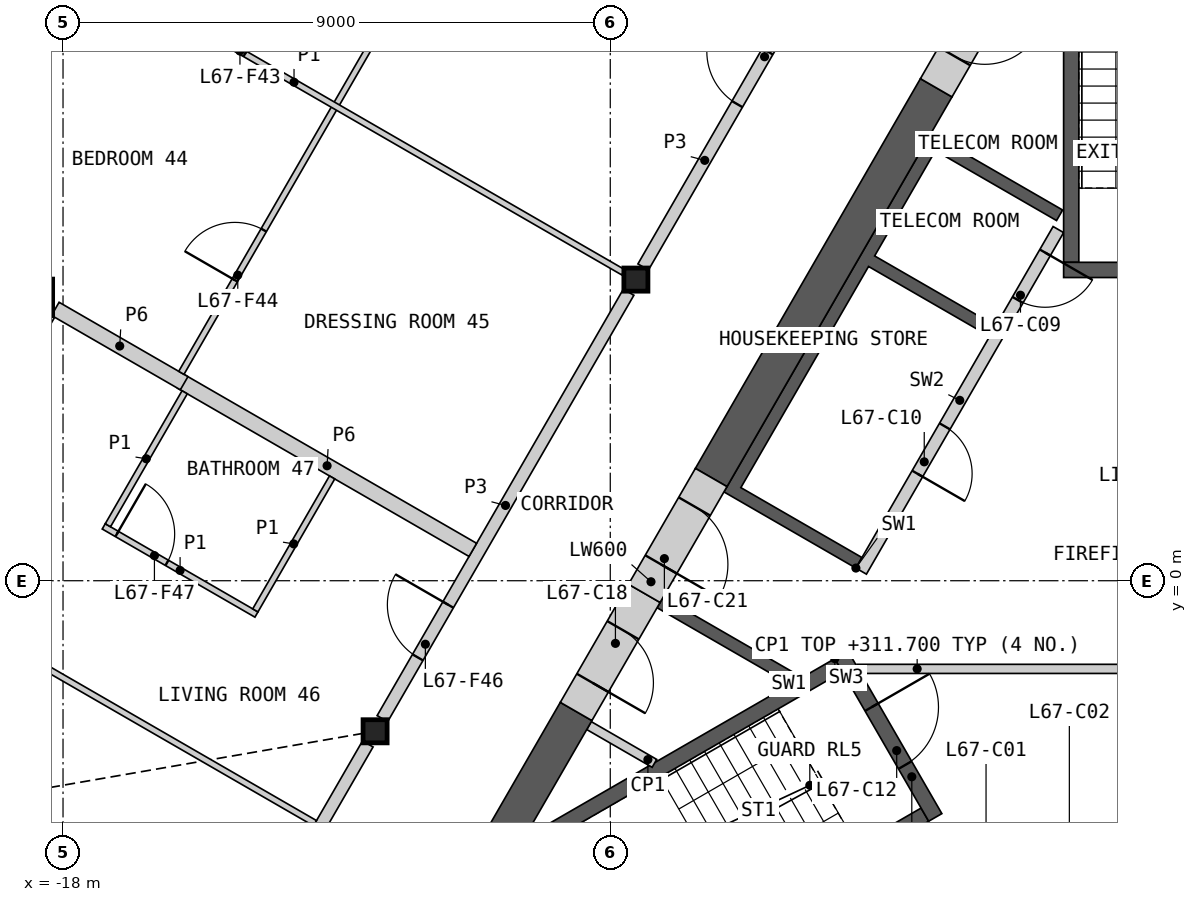
"""IFC4 building model, lengths in metres.
Left out: names, types, materials, properties, quantities, classifications, styles, units other than length and angle.
Written with IfcOpenShell. Run it as: python <this file> out.ifc"""

import sys

from ifc_helpers import new_model, si_unit, direction, frame, frame_2d, origin, origin_2d, place, context, subcontext, project, spatial, polyline, rectangle, hollow_rectangle, i_section, outline, extrude, element, fill, save


model = new_model("IFC4")
c1 = context("Model", 3, precision=1e-05, world=origin(), true_north=direction((0.0, 1.0)))
c2 = subcontext(c1, "Body", "Model", "MODEL_VIEW")
j1 = project(units=[si_unit("LENGTHUNIT", "METRE"), si_unit("PLANEANGLEUNIT", "RADIAN")], contexts=[c1])
p1 = place(None, origin())
s1 = spatial("IfcSite", under=j1, at=p1, CompositionType="ELEMENT")
p2 = place(p1, origin())
s2 = spatial("IfcBuilding", under=s1, at=p2, CompositionType="ELEMENT")
p3 = place(p2, frame((0.0, 0.0, 308.6)))
s3 = spatial("IfcBuildingStorey", under=s2, at=p3, CompositionType="ELEMENT", Elevation=308.6)
p4 = place(p3, frame((-18.471, 4.661, 0.0), z_axis=(0.0, 0.0, 1.0), x_axis=(1.0, 0.0, 0.0)))
e1 = element("IfcColumn", 1, at=p4, inside=s3, PredefinedType="COLUMN", context=c2, shape_type="SweptSolid", body=[
    extrude(hollow_rectangle(XDim=0.6, YDim=0.6, WallThickness=0.04, at=origin_2d()), origin(), (0.0, 0.0, 1.0), 3.4),
])
for number, where, z_axis, x_axis in (
    (2, (-8.578, 4.953, 0.0), (0.0, 0.0, 1.0), (1.0, 0.0, 0.0)),
    (3, (-12.868, -2.476, 0.0), (0.0, 0.0, 1.0), (1.0, 0.0, 0.0)),
):
    element("IfcColumn", number, at=place(p3, frame(where, z_axis=z_axis, x_axis=x_axis)), inside=s3, PredefinedType="COLUMN", context=c2, shape_type="SweptSolid", body=[
        extrude(i_section(OverallWidth=0.396, OverallDepth=0.381, WebThickness=0.019, FlangeThickness=0.03, at=origin_2d()), origin(), (0.0, 0.0, 1.0), 3.4),
    ])
p5 = place(p3, origin())
e4 = element("IfcWall", 4, at=p5, inside=s3, PredefinedType="SHEAR", context=c2, shape_type="SweptSolid", body=[
    extrude(outline(polyline([(-6.061, -1.697), (-8.231, -0.444), (-8.131, -0.271), (-5.96, -1.524), (-6.061, -1.697)])), origin(), (0.0, 0.0, 1.0), 3.1),
])
p6 = place(p3, origin())
e5 = element("IfcWall", 5, at=p6, inside=s3, PredefinedType="SHEAR", context=c2, shape_type="SweptSolid", body=[
    extrude(outline(polyline([(-4.96, 0.208), (-7.131, 1.461), (-3.731, 7.35), (-1.561, 6.097), (-1.66, 5.924), (-3.652, 7.074), (-4.652, 5.342), (-2.66, 4.192), (-2.76, 4.019), (-4.752, 5.169), (-6.852, 1.531), (-4.861, 0.381), (-4.96, 0.208)])), origin(), (0.0, 0.0, 1.0), 3.1),
])
p7 = place(p3, frame((-1.631, 5.776, 0.0), z_axis=(0.0, 0.0, 1.0), x_axis=(-0.499992876559, -0.866029516466, 0.0)))
e6 = element("IfcWall", 6, at=p7, inside=s3, PredefinedType="SOLIDWALL", context=c2, shape_type="SweptSolid", body=[
    extrude(rectangle(XDim=6.486, YDim=0.2, at=frame_2d((3.243, 0.0))), origin(), (0.0, 0.0, 1.0), 3.1),
])
p8 = place(p7, frame((0.437, 0.0, 0.0)))
e7 = element("IfcOpeningElement", 7, at=p8, cuts=e6, PredefinedType="OPENING", context=c2, shape_type="SweptSolid", body=[
    extrude(rectangle(XDim=0.9, YDim=2.1, at=frame_2d((0.45, 1.05))), frame((0.0, 0.11, 0.0), z_axis=(0.0, -1.0, 0.0), x_axis=(1.0, 0.0, 0.0)), (0.0, 0.0, 1.0), 0.22),
])
p9 = place(p7, frame((3.737, 0.0, 0.0)))
e8 = element("IfcOpeningElement", 8, at=p9, cuts=e6, PredefinedType="OPENING", context=c2, shape_type="SweptSolid", body=[
    extrude(rectangle(XDim=0.9, YDim=2.1, at=frame_2d((0.45, 1.05))), frame((0.0, 0.11, 0.0), z_axis=(0.0, -1.0, 0.0), x_axis=(1.0, 0.0, 0.0)), (0.0, 0.0, 1.0), 0.22),
])
p10 = place(p3, frame((-4.941, -1.45, 0.0), z_axis=(0.0, 0.0, 1.0), x_axis=(1.0, 0.0, 0.0)))
e9 = element("IfcWall", 9, at=p10, inside=s3, PredefinedType="PARTITIONING", context=c2, shape_type="SweptSolid", body=[
    extrude(rectangle(XDim=9.882, YDim=0.15, at=frame_2d((4.941, 0.0))), origin(), (0.0, 0.0, 1.0), 3.1),
])
p11 = place(p10, frame((4.391, 0.0, 0.0)))
e10 = element("IfcOpeningElement", 10, at=p11, cuts=e9, PredefinedType="OPENING", context=c2, shape_type="SweptSolid", body=[
    extrude(rectangle(XDim=1.1, YDim=2.1, at=frame_2d((0.55, 1.05))), frame((0.0, 0.085, 0.0), z_axis=(0.0, -1.0, 0.0), x_axis=(1.0, 0.0, 0.0)), (0.0, 0.0, 1.0), 0.17),
])
p12 = place(p3, origin())
e11 = element("IfcWall", 11, at=p12, inside=s3, PredefinedType="SHEAR", context=c2, shape_type="SweptSolid", body=[
    extrude(outline(polyline([(-5.307, -1.281), (-10.374, -4.206), (-10.032, -4.298), (-5.182, -1.498), (-5.307, -1.281)])), origin(), (0.0, 0.0, 1.0), 3.1),
])
p13 = place(p3, origin())
e12 = element("IfcWall", 12, at=p13, inside=s3, PredefinedType="SHEAR", context=c2, shape_type="SweptSolid", body=[
    extrude(outline(polyline([(-8.738, -6.539), (-8.83, -6.881), (-3.763, -3.956), (-3.888, -3.739), (-8.738, -6.539)])), origin(), (0.0, 0.0, 1.0), 3.1),
])
p14 = place(p3, frame((-5.199, -1.219, 0.0), z_axis=(0.0, 0.0, 1.0), x_axis=(0.499982516597, -0.866035497597, 0.0)))
e13 = element("IfcWall", 13, at=p14, inside=s3, PredefinedType="SHEAR", context=c2, shape_type="SweptSolid", body=[
    extrude(rectangle(XDim=3.088, YDim=0.25, at=frame_2d((1.544, 0.0))), origin(), (0.0, 0.0, 1.0), 3.1),
])
p15 = place(p14, frame((0.994, 0.0, 0.0)))
e14 = element("IfcOpeningElement", 14, at=p15, cuts=e13, PredefinedType="OPENING", context=c2, shape_type="SweptSolid", body=[
    extrude(rectangle(XDim=1.1, YDim=2.1, at=frame_2d((0.55, 1.05))), frame((0.0, 0.135, 0.0), z_axis=(0.0, -1.0, 0.0), x_axis=(1.0, 0.0, 0.0)), (0.0, 0.0, 1.0), 0.27),
])
p16 = place(p3, origin())
e15 = element("IfcWall", 15, at=p16, inside=s3, PredefinedType="SHEAR", context=c2, shape_type="SweptSolid", body=[
    extrude(outline(polyline([(-1.294, 10.837), (-1.544, 11.087), (-1.544, 5.237), (-1.294, 5.237), (-1.294, 10.837)])), origin(), (0.0, 0.0, 1.0), 3.1),
])
p17 = place(p3, frame((1.544, 5.112, 0.0), z_axis=(0.0, 0.0, 1.0), x_axis=(-1.0, 0.0, 0.0)))
e16 = element("IfcWall", 16, at=p17, inside=s3, PredefinedType="SHEAR", context=c2, shape_type="SweptSolid", body=[
    extrude(rectangle(XDim=3.088, YDim=0.25, at=frame_2d((1.544, 0.0))), origin(), (0.0, 0.0, 1.0), 3.1),
])
p18 = place(p17, frame((0.994, 0.0, 0.0)))
e17 = element("IfcOpeningElement", 17, at=p18, cuts=e16, PredefinedType="OPENING", context=c2, shape_type="SweptSolid", body=[
    extrude(rectangle(XDim=1.1, YDim=2.1, at=frame_2d((0.55, 1.05))), frame((0.0, 0.135, 0.0), z_axis=(0.0, -1.0, 0.0), x_axis=(1.0, 0.0, 0.0)), (0.0, 0.0, 1.0), 0.27),
])
p19 = place(p3, frame((-9.35, -2.383, 0.0), z_axis=(0.0, 0.0, 1.0), x_axis=(0.866057962423, -0.499943602543, 0.0)))
e18 = element("IfcWall", 18, at=p19, inside=s3, PredefinedType="PARTITIONING", context=c2, shape_type="SweptSolid", body=[
    extrude(rectangle(XDim=1.242, YDim=0.15, at=frame_2d((0.621, 0.0))), origin(), (0.0, 0.0, 1.0), 3.1),
])
p20 = place(p3, frame((-3.639, 8.107, 0.0), z_axis=(0.0, 0.0, 1.0), x_axis=(-0.49999180351, -0.866030135978, 0.0)))
e19 = element("IfcWall", 19, at=p20, inside=s3, PredefinedType="SHEAR", context=c2, shape_type="SweptSolid", body=[
    extrude(rectangle(XDim=7.401, YDim=0.6, at=frame_2d((3.701, 0.0))), origin(), (0.0, 0.0, 1.0), 3.1),
])
p21 = place(p3, frame((-9.562, -2.15, 0.0), z_axis=(0.0, 0.0, 1.0), x_axis=(-0.500015214976, -0.866016619236, 0.0)))
e20 = element("IfcWall", 20, at=p21, inside=s3, PredefinedType="SHEAR", context=c2, shape_type="SweptSolid", body=[
    extrude(rectangle(XDim=5.318, YDim=0.6, at=frame_2d((2.659, 0.0))), origin(), (0.0, 0.0, 1.0), 3.1),
])
p22 = place(p3, frame((-8.44, -0.208, 0.0), z_axis=(0.0, 0.0, 1.0), x_axis=(-0.500001951578, -0.866024277037, 0.0)))
e21 = element("IfcWall", 21, at=p22, inside=s3, PredefinedType="SHEAR", context=c2, shape_type="SweptSolid", body=[
    extrude(rectangle(XDim=2.243, YDim=0.6, at=frame_2d((1.122, 0.0))), origin(), (0.0, 0.0, 1.0), 3.1),
])
p23 = place(p22, frame((0.7, 0.0, 0.0)))
e22 = element("IfcOpeningElement", 22, at=p23, cuts=e21, PredefinedType="OPENING", context=c2, shape_type="SweptSolid", body=[
    extrude(rectangle(XDim=1.0, YDim=2.1, at=frame_2d((0.5, 1.05))), frame((0.0, 0.31, 0.0), z_axis=(0.0, -1.0, 0.0), x_axis=(1.0, 0.0, 0.0)), (0.0, 0.0, 1.0), 0.62),
])
p24 = place(p3, frame((-2.539, 10.013, 0.0), z_axis=(0.0, 0.0, 1.0), x_axis=(-0.50002983664, -0.866008176907, 0.0)))
e23 = element("IfcWall", 23, at=p24, inside=s3, PredefinedType="SHEAR", context=c2, shape_type="SweptSolid", body=[
    extrude(rectangle(XDim=2.2, YDim=0.6, at=frame_2d((1.1, 0.0))), origin(), (0.0, 0.0, 1.0), 3.1),
])
p25 = place(p24, frame((0.6, 0.0, 0.0)))
e24 = element("IfcOpeningElement", 24, at=p25, cuts=e23, PredefinedType="OPENING", context=c2, shape_type="SweptSolid", body=[
    extrude(rectangle(XDim=1.0, YDim=2.1, at=frame_2d((0.5, 1.05))), frame((0.0, 0.31, 0.0), z_axis=(0.0, -1.0, 0.0), x_axis=(1.0, 0.0, 0.0)), (0.0, 0.0, 1.0), 0.62),
])
p26 = place(p3, frame((-7.34, 1.698, 0.0), z_axis=(0.0, 0.0, 1.0), x_axis=(-0.50002983664, -0.866008176907, 0.0)))
e25 = element("IfcWall", 25, at=p26, inside=s3, PredefinedType="SHEAR", context=c2, shape_type="SweptSolid", body=[
    extrude(rectangle(XDim=2.2, YDim=0.6, at=frame_2d((1.1, 0.0))), origin(), (0.0, 0.0, 1.0), 3.1),
])
p27 = place(p26, frame((0.55, 0.0, 0.0)))
e26 = element("IfcOpeningElement", 26, at=p27, cuts=e25, PredefinedType="OPENING", context=c2, shape_type="SweptSolid", body=[
    extrude(rectangle(XDim=1.1, YDim=2.1, at=frame_2d((0.55, 1.05))), frame((0.0, 0.31, 0.0), z_axis=(0.0, -1.0, 0.0), x_axis=(1.0, 0.0, 0.0)), (0.0, 0.0, 1.0), 0.62),
])
p28 = place(p3, frame((-8.458, 5.16, 0.0), z_axis=(0.0, 0.0, 1.0), x_axis=(0.499984266882, 0.866034487114, 0.0)))
e27 = element("IfcWall", 27, at=p28, inside=s3, PredefinedType="PARTITIONING", context=c2, shape_type="SweptSolid", body=[
    extrude(rectangle(XDim=8.099, YDim=0.2, at=frame_2d((4.049, 0.0))), origin(), (0.0, 0.0, 1.0), 3.1),
])
p29 = place(p28, frame((3.093, 0.0, 0.0)))
e28 = element("IfcOpeningElement", 28, at=p29, cuts=e27, PredefinedType="OPENING", context=c2, shape_type="SweptSolid", body=[
    extrude(rectangle(XDim=1.0, YDim=2.1, at=frame_2d((0.5, 1.05))), frame((0.0, 0.11, 0.0), z_axis=(0.0, -1.0, 0.0), x_axis=(1.0, 0.0, 0.0)), (0.0, 0.0, 1.0), 0.22),
])
p30 = place(p3, frame((-12.748, -2.269, 0.0), z_axis=(0.0, 0.0, 1.0), x_axis=(0.499984266882, 0.866034487114, 0.0)))
e29 = element("IfcWall", 29, at=p30, inside=s3, PredefinedType="PARTITIONING", context=c2, shape_type="SweptSolid", body=[
    extrude(rectangle(XDim=8.099, YDim=0.2, at=frame_2d((4.049, 0.0))), origin(), (0.0, 0.0, 1.0), 3.1),
])
p31 = place(p30, frame((1.164, 0.0, 0.0)))
e30 = element("IfcOpeningElement", 30, at=p31, cuts=e29, PredefinedType="OPENING", context=c2, shape_type="SweptSolid", body=[
    extrude(rectangle(XDim=1.0, YDim=2.1, at=frame_2d((0.5, 1.05))), frame((0.0, 0.11, 0.0), z_axis=(0.0, -1.0, 0.0), x_axis=(1.0, 0.0, 0.0)), (0.0, 0.0, 1.0), 0.22),
])
p32 = place(p3, frame((-16.054, 3.275, 0.0), z_axis=(0.0, 0.0, 1.0), x_axis=(0.866019581949, -0.500010083578, 0.0)))
e31 = element("IfcWall", 31, at=p32, inside=s3, PredefinedType="PARTITIONING", context=c2, shape_type="SweptSolid", body=[
    extrude(rectangle(XDim=5.535, YDim=0.25, at=frame_2d((2.768, 0.0))), origin(), (0.0, 0.0, 1.0), 2.33),
])
p33 = place(p3, frame((-15.131, -6.397, 0.0), z_axis=(0.0, 0.0, 1.0), x_axis=(0.500003406062, 0.866023437285, 0.0)))
e32 = element("IfcWall", 32, at=p33, inside=s3, PredefinedType="PARTITIONING", context=c2, shape_type="SweptSolid", body=[
    extrude(rectangle(XDim=4.288, YDim=0.2, at=frame_2d((2.144, 0.0))), origin(), (0.0, 0.0, 1.0), 3.1),
])
p34 = place(p3, frame((-18.127, 4.472, 0.0), z_axis=(0.0, 0.0, 1.0), x_axis=(0.866017755388, -0.500013247177, 0.0)))
e33 = element("IfcWall", 33, at=p34, inside=s3, PredefinedType="PARTITIONING", context=c2, shape_type="SweptSolid", body=[
    extrude(rectangle(XDim=2.447, YDim=0.25, at=frame_2d((1.223, 0.0))), origin(), (0.0, 0.0, 1.0), 2.33),
])
p35 = place(p3, frame((-16.054, 3.419, 0.0), z_axis=(0.0, 0.0, 1.0), x_axis=(0.499999256795, 0.866025832873, 0.0)))
e34 = element("IfcWall", 34, at=p35, inside=s3, PredefinedType="PARTITIONING", context=c2, shape_type="SweptSolid", body=[
    extrude(rectangle(XDim=15.448, YDim=0.1, at=frame_2d((7.724, 0.0))), origin(), (0.0, 0.0, 1.0), 2.33),
])
p36 = place(p35, frame((8.306, 0.0, 0.0)))
e35 = element("IfcOpeningElement", 35, at=p36, cuts=e34, PredefinedType="OPENING", context=c2, shape_type="SweptSolid", body=[
    extrude(rectangle(XDim=0.95, YDim=2.1, at=frame_2d((0.475, 1.05))), frame((0.0, 0.06, 0.0), z_axis=(0.0, -1.0, 0.0), x_axis=(1.0, 0.0, 0.0)), (0.0, 0.0, 1.0), 0.12),
])
p37 = place(p35, frame((1.76, 0.0, 0.0)))
e36 = element("IfcOpeningElement", 36, at=p37, cuts=e34, PredefinedType="OPENING", context=c2, shape_type="SweptSolid", body=[
    extrude(rectangle(XDim=0.95, YDim=2.1, at=frame_2d((0.475, 1.05))), frame((0.0, 0.06, 0.0), z_axis=(0.0, -1.0, 0.0), x_axis=(1.0, 0.0, 0.0)), (0.0, 0.0, 1.0), 0.12),
])
p38 = place(p3, frame((-24.815, 2.339, 0.0), z_axis=(0.0, 0.0, 1.0), x_axis=(0.866021406514, -0.500006923412, 0.0)))
e37 = element("IfcWall", 37, at=p38, inside=s3, PredefinedType="PARTITIONING", context=c2, shape_type="SweptSolid", body=[
    extrude(rectangle(XDim=12.654, YDim=0.1, at=frame_2d((6.327, 0.0))), origin(), (0.0, 0.0, 1.0), 2.33),
])
p39 = place(p38, frame((2.851, 0.0, 0.0)))
e38 = element("IfcOpeningElement", 38, at=p39, cuts=e37, PredefinedType="OPENING", context=c2, shape_type="SweptSolid", body=[
    extrude(rectangle(XDim=0.95, YDim=2.1, at=frame_2d((0.475, 1.05))), frame((0.0, 0.06, 0.0), z_axis=(0.0, -1.0, 0.0), x_axis=(1.0, 0.0, 0.0)), (0.0, 0.0, 1.0), 0.12),
])
p40 = place(p3, frame((-19.615, 11.325, 0.0), z_axis=(0.0, 0.0, 1.0), x_axis=(0.86602139559, -0.500006942333, 0.0)))
e39 = element("IfcWall", 39, at=p40, inside=s3, PredefinedType="PARTITIONING", context=c2, shape_type="SweptSolid", body=[
    extrude(rectangle(XDim=12.505, YDim=0.1, at=frame_2d((6.252, 0.0))), origin(), (0.0, 0.0, 1.0), 2.33),
])
p41 = place(p40, frame((4.37, 0.0, 0.0)))
e40 = element("IfcOpeningElement", 40, at=p41, cuts=e39, PredefinedType="OPENING", context=c2, shape_type="SweptSolid", body=[
    extrude(rectangle(XDim=0.95, YDim=2.1, at=frame_2d((0.475, 1.05))), frame((0.0, 0.06, 0.0), z_axis=(0.0, -1.0, 0.0), x_axis=(1.0, 0.0, 0.0)), (0.0, 0.0, 1.0), 0.12),
])
p42 = place(p3, frame((-20.689, 0.014, 0.0), z_axis=(0.0, 0.0, 1.0), x_axis=(0.500003822013, 0.866023197133, 0.0)))
e41 = element("IfcWall", 41, at=p42, inside=s3, PredefinedType="PARTITIONING", context=c2, shape_type="SweptSolid", body=[
    extrude(rectangle(XDim=5.007, YDim=0.1, at=frame_2d((2.504, 0.0))), origin(), (0.0, 0.0, 1.0), 2.33),
])
p43 = place(p42, frame((0.86, 0.0, 0.0)))
e42 = element("IfcOpeningElement", 42, at=p43, cuts=e41, PredefinedType="OPENING", context=c2, shape_type="SweptSolid", body=[
    extrude(rectangle(XDim=0.95, YDim=2.1, at=frame_2d((0.475, 1.05))), frame((0.0, 0.06, 0.0), z_axis=(0.0, -1.0, 0.0), x_axis=(1.0, 0.0, 0.0)), (0.0, 0.0, 1.0), 0.12),
])
p44 = place(p3, frame((-17.33, 0.894, 0.0), z_axis=(0.0, 0.0, 1.0), x_axis=(0.866032775405, -0.499987231761, 0.0)))
e43 = element("IfcWall", 43, at=p44, inside=s3, PredefinedType="PARTITIONING", context=c2, shape_type="SweptSolid", body=[
    extrude(rectangle(XDim=2.9, YDim=0.1, at=frame_2d((1.45, 0.0))), origin(), (0.0, 0.0, 1.0), 2.33),
])
p45 = place(p44, frame((0.25, 0.0, 0.0)))
e44 = element("IfcOpeningElement", 44, at=p45, cuts=e43, PredefinedType="OPENING", context=c2, shape_type="SweptSolid", body=[
    extrude(rectangle(XDim=0.95, YDim=2.1, at=frame_2d((0.475, 1.05))), frame((0.0, 0.06, 0.0), z_axis=(0.0, -1.0, 0.0), x_axis=(1.0, 0.0, 0.0)), (0.0, 0.0, 1.0), 0.12),
])
p46 = place(p3, frame((-14.837, -0.488, 0.0), z_axis=(0.0, 0.0, 1.0), x_axis=(0.499976333282, 0.866039067339, 0.0)))
e45 = element("IfcWall", 45, at=p46, inside=s3, PredefinedType="PARTITIONING", context=c2, shape_type="SweptSolid", body=[
    extrude(rectangle(XDim=2.525, YDim=0.1, at=frame_2d((1.262, 0.0))), origin(), (0.0, 0.0, 1.0), 2.33),
])
p47 = place(p3, frame((-17.262, 0.912, 0.0), z_axis=(0.0, 0.0, 1.0), x_axis=(0.500048846702, 0.865997200291, 0.0)))
e46 = element("IfcWall", 46, at=p47, inside=s3, PredefinedType="PARTITIONING", context=c2, shape_type="SweptSolid", body=[
    extrude(rectangle(XDim=2.525, YDim=0.1, at=frame_2d((1.263, 0.0))), origin(), (0.0, 0.0, 1.0), 2.33),
])
p48 = place(p8, origin())
e47 = element("IfcDoor", 47, at=p48, inside=s3, OperationType="SINGLE_SWING_LEFT", PredefinedType="DOOR", context=c2, shape_type="SweptSolid", body=[
    extrude(rectangle(XDim=0.9, YDim=2.1, at=frame_2d((0.45, 1.05))), frame((0.0, 0.025, 0.0), z_axis=(0.0, -1.0, 0.0), x_axis=(1.0, 0.0, 0.0)), (0.0, 0.0, 1.0), 0.05),
])
fill(e7, e47)
p49 = place(p9, origin())
e48 = element("IfcDoor", 48, at=p49, inside=s3, OperationType="SINGLE_SWING_RIGHT", PredefinedType="DOOR", context=c2, shape_type="SweptSolid", body=[
    extrude(rectangle(XDim=0.9, YDim=2.1, at=frame_2d((0.45, 1.05))), frame((0.0, 0.025, 0.0), z_axis=(0.0, -1.0, 0.0), x_axis=(1.0, 0.0, 0.0)), (0.0, 0.0, 1.0), 0.05),
])
fill(e8, e48)
p50 = place(p15, origin())
e49 = element("IfcDoor", 49, at=p50, inside=s3, OperationType="SINGLE_SWING_LEFT", PredefinedType="DOOR", context=c2, shape_type="SweptSolid", body=[
    extrude(rectangle(XDim=1.1, YDim=2.1, at=frame_2d((0.55, 1.05))), frame((0.0, 0.025, 0.0), z_axis=(0.0, -1.0, 0.0), x_axis=(1.0, 0.0, 0.0)), (0.0, 0.0, 1.0), 0.05),
])
fill(e14, e49)
p51 = place(p23, origin())
e50 = element("IfcDoor", 50, at=p51, inside=s3, OperationType="SINGLE_SWING_RIGHT", PredefinedType="DOOR", context=c2, shape_type="SweptSolid", body=[
    extrude(rectangle(XDim=1.0, YDim=2.1, at=frame_2d((0.5, 1.05))), frame((0.0, 0.055, 0.0), z_axis=(0.0, -1.0, 0.0), x_axis=(1.0, 0.0, 0.0)), (0.0, 0.0, 1.0), 0.05),
])
fill(e22, e50)
p52 = place(p25, origin())
e51 = element("IfcDoor", 51, at=p52, inside=s3, OperationType="SINGLE_SWING_LEFT", PredefinedType="DOOR", context=c2, shape_type="SweptSolid", body=[
    extrude(rectangle(XDim=1.0, YDim=2.1, at=frame_2d((0.5, 1.05))), frame((0.0, 0.055, 0.0), z_axis=(0.0, -1.0, 0.0), x_axis=(1.0, 0.0, 0.0)), (0.0, 0.0, 1.0), 0.05),
])
fill(e24, e51)
p53 = place(p27, origin())
e52 = element("IfcDoor", 52, at=p53, inside=s3, OperationType="SINGLE_SWING_RIGHT", PredefinedType="DOOR", context=c2, shape_type="SweptSolid", body=[
    extrude(rectangle(XDim=1.1, YDim=2.1, at=frame_2d((0.55, 1.05))), frame((0.0, 0.055, 0.0), z_axis=(0.0, -1.0, 0.0), x_axis=(1.0, 0.0, 0.0)), (0.0, 0.0, 1.0), 0.05),
])
fill(e26, e52)
p54 = place(p29, origin())
e53 = element("IfcDoor", 53, at=p54, inside=s3, OperationType="SINGLE_SWING_RIGHT", PredefinedType="DOOR", context=c2, shape_type="SweptSolid", body=[
    extrude(rectangle(XDim=1.0, YDim=2.1, at=frame_2d((0.5, 1.05))), frame((0.0, 0.025, 0.0), z_axis=(0.0, -1.0, 0.0), x_axis=(1.0, 0.0, 0.0)), (0.0, 0.0, 1.0), 0.05),
])
fill(e28, e53)
p55 = place(p41, origin())
e54 = element("IfcDoor", 54, at=p55, inside=s3, OperationType="SINGLE_SWING_RIGHT", PredefinedType="DOOR", context=c2, shape_type="SweptSolid", body=[
    extrude(rectangle(XDim=0.95, YDim=2.1, at=frame_2d((0.475, 1.05))), frame((0.0, 0.025, 0.0), z_axis=(0.0, -1.0, 0.0), x_axis=(1.0, 0.0, 0.0)), (0.0, 0.0, 1.0), 0.05),
])
fill(e40, e54)
p56 = place(p37, origin())
e55 = element("IfcDoor", 55, at=p56, inside=s3, OperationType="SINGLE_SWING_LEFT", PredefinedType="DOOR", context=c2, shape_type="SweptSolid", body=[
    extrude(rectangle(XDim=0.95, YDim=2.1, at=frame_2d((0.475, 1.05))), frame((0.0, 0.025, 0.0), z_axis=(0.0, -1.0, 0.0), x_axis=(1.0, 0.0, 0.0)), (0.0, 0.0, 1.0), 0.05),
])
fill(e36, e55)
p57 = place(p31, origin())
e56 = element("IfcDoor", 56, at=p57, inside=s3, OperationType="SINGLE_SWING_RIGHT", PredefinedType="DOOR", context=c2, shape_type="SweptSolid", body=[
    extrude(rectangle(XDim=1.0, YDim=2.1, at=frame_2d((0.5, 1.05))), frame((0.0, 0.025, 0.0), z_axis=(0.0, -1.0, 0.0), x_axis=(1.0, 0.0, 0.0)), (0.0, 0.0, 1.0), 0.05),
])
fill(e30, e56)
p58 = place(p45, origin())
e57 = element("IfcDoor", 57, at=p58, inside=s3, OperationType="SINGLE_SWING_LEFT", PredefinedType="DOOR", context=c2, shape_type="SweptSolid", body=[
    extrude(rectangle(XDim=0.95, YDim=2.1, at=frame_2d((0.475, 1.05))), frame((0.0, 0.025, 0.0), z_axis=(0.0, -1.0, 0.0), x_axis=(1.0, 0.0, 0.0)), (0.0, 0.0, 1.0), 0.05),
])
fill(e44, e57)
save(model, sys.argv[1])
